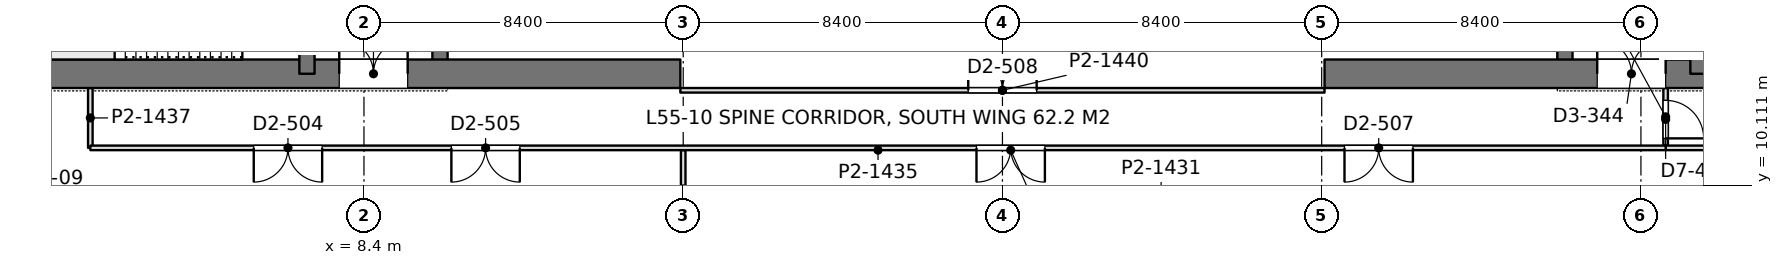
"""IFC4 building model, lengths in metres.
Left out: names, types, materials, properties, quantities, classifications, styles, units other than length and angle.
Written with IfcOpenShell. Run it as: python <this file> out.ifc"""

import sys

from ifc_helpers import new_model, si_unit, direction, frame, frame_2d, origin, place, context, subcontext, project, spatial, rectangle, extrude, element, fill, save


model = new_model("IFC4")
c1 = context("Model", 3, precision=1e-05, world=origin(), true_north=direction((0.0, 1.0)))
c2 = subcontext(c1, "Body", "Model", "MODEL_VIEW")
j1 = project(units=[si_unit("LENGTHUNIT", "METRE"), si_unit("PLANEANGLEUNIT", "RADIAN")], contexts=[c1])
p1 = place(None, origin())
s1 = spatial("IfcSite", under=j1, at=p1, CompositionType="ELEMENT")
p2 = place(p1, origin())
s2 = spatial("IfcBuilding", under=s1, at=p2, CompositionType="ELEMENT")
p3 = place(p2, frame((0.0, 0.0, 240.6)))
s3 = spatial("IfcBuildingStorey", under=s2, at=p3, CompositionType="ELEMENT", Elevation=240.6)
p4 = place(p3, frame((-1.125, 13.05, 0.0), z_axis=(0.0, 0.0, 1.0), x_axis=(1.0, 0.0, 0.0)))
e1 = element("IfcWall", 1, at=p4, inside=s3, PredefinedType="SHEAR", context=c2, shape_type="SweptSolid", body=[
    extrude(rectangle(XDim=17.85, YDim=0.75, at=frame_2d((8.925, 0.0))), origin(), (0.0, 0.0, 1.0), 4.2),
])
p5 = place(p4, frame((8.875, 0.0, 0.0)))
e2 = element("IfcOpeningElement", 2, at=p5, cuts=e1, PredefinedType="OPENING", context=c2, shape_type="SweptSolid", body=[
    extrude(rectangle(XDim=1.8, YDim=2.4, at=frame_2d((0.9, 1.2))), frame((0.0, 0.385, 0.0), z_axis=(0.0, -1.0, 0.0), x_axis=(1.0, 0.0, 0.0)), (0.0, 0.0, 1.0), 0.77),
])
p6 = place(p3, frame((6.9, 13.05, 0.0), z_axis=(0.0, 0.0, 1.0), x_axis=(0.0, 1.0, 0.0)))
e3 = element("IfcWall", 3, at=p6, inside=s3, PredefinedType="SHEAR", context=c2, shape_type="SweptSolid", body=[
    extrude(rectangle(XDim=24.3, YDim=0.4, at=frame_2d((12.15, 0.0))), origin(), (0.0, 0.0, 1.0), 4.2),
])
p7 = place(p6, frame((1.3, 0.0, 0.0)))
e4 = element("IfcOpeningElement", 4, at=p7, cuts=e3, PredefinedType="OPENING", context=c2, shape_type="SweptSolid", body=[
    extrude(rectangle(XDim=1.0, YDim=2.2, at=frame_2d((0.5, 1.1))), frame((0.0, 0.21, 0.0), z_axis=(0.0, -1.0, 0.0), x_axis=(1.0, 0.0, 0.0)), (0.0, 0.0, 1.0), 0.42),
])
p8 = place(p6, frame((22.0, 0.0, 0.0)))
e5 = element("IfcOpeningElement", 5, at=p8, cuts=e3, PredefinedType="OPENING", context=c2, shape_type="SweptSolid", body=[
    extrude(rectangle(XDim=1.0, YDim=2.2, at=frame_2d((0.5, 1.1))), frame((0.0, 0.21, 0.0), z_axis=(0.0, -1.0, 0.0), x_axis=(1.0, 0.0, 0.0)), (0.0, 0.0, 1.0), 0.42),
])
p9 = place(p6, frame((5.55, 0.0, 0.0)))
e6 = element("IfcOpeningElement", 6, at=p9, cuts=e3, PredefinedType="OPENING", context=c2, shape_type="SweptSolid", body=[
    extrude(rectangle(XDim=1.0, YDim=2.2, at=frame_2d((0.5, 1.1))), frame((0.0, 0.21, 0.0), z_axis=(0.0, -1.0, 0.0), x_axis=(1.0, 0.0, 0.0)), (0.0, 0.0, 1.0), 0.42),
])
p10 = place(p6, frame((9.55, 0.0, 0.0)))
e7 = element("IfcOpeningElement", 7, at=p10, cuts=e3, PredefinedType="OPENING", context=c2, shape_type="SweptSolid", body=[
    extrude(rectangle(XDim=1.0, YDim=2.2, at=frame_2d((0.5, 1.1))), frame((0.0, 0.21, 0.0), z_axis=(0.0, -1.0, 0.0), x_axis=(1.0, 0.0, 0.0)), (0.0, 0.0, 1.0), 0.42),
])
p11 = place(p6, frame((12.8, 0.0, 0.0)))
e8 = element("IfcOpeningElement", 8, at=p11, cuts=e3, PredefinedType="OPENING", context=c2, shape_type="SweptSolid", body=[
    extrude(rectangle(XDim=1.1, YDim=2.2, at=frame_2d((0.55, 1.1))), frame((0.0, 0.21, 0.0), z_axis=(0.0, -1.0, 0.0), x_axis=(1.0, 0.0, 0.0)), (0.0, 0.0, 1.0), 0.42),
])
p12 = place(p6, frame((15.538, 0.0, 0.0)))
e9 = element("IfcOpeningElement", 9, at=p12, cuts=e3, PredefinedType="OPENING", context=c2, shape_type="SweptSolid", body=[
    extrude(rectangle(XDim=1.1, YDim=2.2, at=frame_2d((0.55, 1.1))), frame((0.0, 0.21, 0.0), z_axis=(0.0, -1.0, 0.0), x_axis=(1.0, 0.0, 0.0)), (0.0, 0.0, 1.0), 0.42),
])
p13 = place(p6, frame((18.262, 0.0, 0.0)))
e10 = element("IfcOpeningElement", 10, at=p13, cuts=e3, PredefinedType="OPENING", context=c2, shape_type="SweptSolid", body=[
    extrude(rectangle(XDim=1.1, YDim=2.2, at=frame_2d((0.55, 1.1))), frame((0.0, 0.21, 0.0), z_axis=(0.0, -1.0, 0.0), x_axis=(1.0, 0.0, 0.0)), (0.0, 0.0, 1.0), 0.42),
])
p14 = place(p3, frame((10.4, 13.05, 0.0), z_axis=(0.0, 0.0, 1.0), x_axis=(0.0, 1.0, 0.0)))
e11 = element("IfcWall", 11, at=p14, inside=s3, PredefinedType="SHEAR", context=c2, shape_type="SweptSolid", body=[
    extrude(rectangle(XDim=24.3, YDim=0.4, at=frame_2d((12.15, 0.0))), origin(), (0.0, 0.0, 1.0), 4.2),
])
p15 = place(p14, frame((15.75, 0.0, 0.0)))
e12 = element("IfcOpeningElement", 12, at=p15, cuts=e11, PredefinedType="OPENING", context=c2, shape_type="SweptSolid", body=[
    extrude(rectangle(XDim=1.1, YDim=2.2, at=frame_2d((0.55, 1.1))), frame((0.0, 0.21, 0.0), z_axis=(0.0, -1.0, 0.0), x_axis=(1.0, 0.0, 0.0)), (0.0, 0.0, 1.0), 0.42),
])
p16 = place(p14, frame((18.6, 0.0, 0.0)))
e13 = element("IfcOpeningElement", 13, at=p16, cuts=e11, PredefinedType="OPENING", context=c2, shape_type="SweptSolid", body=[
    extrude(rectangle(XDim=1.1, YDim=2.2, at=frame_2d((0.55, 1.1))), frame((0.0, 0.21, 0.0), z_axis=(0.0, -1.0, 0.0), x_axis=(1.0, 0.0, 0.0)), (0.0, 0.0, 1.0), 0.42),
])
p17 = place(p14, frame((21.45, 0.0, 0.0)))
e14 = element("IfcOpeningElement", 14, at=p17, cuts=e11, PredefinedType="OPENING", context=c2, shape_type="SweptSolid", body=[
    extrude(rectangle(XDim=1.1, YDim=2.2, at=frame_2d((0.55, 1.1))), frame((0.0, 0.21, 0.0), z_axis=(0.0, -1.0, 0.0), x_axis=(1.0, 0.0, 0.0)), (0.0, 0.0, 1.0), 0.42),
])
p18 = place(p14, frame((8.65, 0.0, 0.0)))
e15 = element("IfcOpeningElement", 15, at=p18, cuts=e11, PredefinedType="OPENING", context=c2, shape_type="SweptSolid", body=[
    extrude(rectangle(XDim=1.8, YDim=2.4, at=frame_2d((0.9, 1.2))), frame((0.0, 0.21, 0.0), z_axis=(0.0, -1.0, 0.0), x_axis=(1.0, 0.0, 0.0)), (0.0, 0.0, 1.0), 0.42),
])
p19 = place(p3, frame((33.675, 13.05, 0.0), z_axis=(0.0, 0.0, 1.0), x_axis=(1.0, 0.0, 0.0)))
e16 = element("IfcWall", 16, at=p19, inside=s3, PredefinedType="SHEAR", context=c2, shape_type="SweptSolid", body=[
    extrude(rectangle(XDim=17.85, YDim=0.75, at=frame_2d((8.925, 0.0))), origin(), (0.0, 0.0, 1.0), 4.2),
])
p20 = place(p19, frame((7.175, 0.0, 0.0)))
e17 = element("IfcOpeningElement", 17, at=p20, cuts=e16, PredefinedType="OPENING", context=c2, shape_type="SweptSolid", body=[
    extrude(rectangle(XDim=1.8, YDim=2.4, at=frame_2d((0.9, 1.2))), frame((0.0, 0.385, 0.0), z_axis=(0.0, -1.0, 0.0), x_axis=(1.0, 0.0, 0.0)), (0.0, 0.0, 1.0), 0.77),
])
p21 = place(p3, frame((43.5, 13.05, 0.0), z_axis=(0.0, 0.0, 1.0), x_axis=(0.0, 1.0, 0.0)))
e18 = element("IfcWall", 18, at=p21, inside=s3, PredefinedType="SHEAR", context=c2, shape_type="SweptSolid", body=[
    extrude(rectangle(XDim=24.3, YDim=0.4, at=frame_2d((12.15, 0.0))), origin(), (0.0, 0.0, 1.0), 4.2),
])
p22 = place(p21, frame((1.3, 0.0, 0.0)))
e19 = element("IfcOpeningElement", 19, at=p22, cuts=e18, PredefinedType="OPENING", context=c2, shape_type="SweptSolid", body=[
    extrude(rectangle(XDim=1.0, YDim=2.2, at=frame_2d((0.5, 1.1))), frame((0.0, 0.21, 0.0), z_axis=(0.0, -1.0, 0.0), x_axis=(1.0, 0.0, 0.0)), (0.0, 0.0, 1.0), 0.42),
])
p23 = place(p21, frame((22.0, 0.0, 0.0)))
e20 = element("IfcOpeningElement", 20, at=p23, cuts=e18, PredefinedType="OPENING", context=c2, shape_type="SweptSolid", body=[
    extrude(rectangle(XDim=1.0, YDim=2.2, at=frame_2d((0.5, 1.1))), frame((0.0, 0.21, 0.0), z_axis=(0.0, -1.0, 0.0), x_axis=(1.0, 0.0, 0.0)), (0.0, 0.0, 1.0), 0.42),
])
p24 = place(p21, frame((5.55, 0.0, 0.0)))
e21 = element("IfcOpeningElement", 21, at=p24, cuts=e18, PredefinedType="OPENING", context=c2, shape_type="SweptSolid", body=[
    extrude(rectangle(XDim=1.0, YDim=2.2, at=frame_2d((0.5, 1.1))), frame((0.0, 0.21, 0.0), z_axis=(0.0, -1.0, 0.0), x_axis=(1.0, 0.0, 0.0)), (0.0, 0.0, 1.0), 0.42),
])
p25 = place(p21, frame((9.55, 0.0, 0.0)))
e22 = element("IfcOpeningElement", 22, at=p25, cuts=e18, PredefinedType="OPENING", context=c2, shape_type="SweptSolid", body=[
    extrude(rectangle(XDim=1.0, YDim=2.2, at=frame_2d((0.5, 1.1))), frame((0.0, 0.21, 0.0), z_axis=(0.0, -1.0, 0.0), x_axis=(1.0, 0.0, 0.0)), (0.0, 0.0, 1.0), 0.42),
])
p26 = place(p21, frame((12.8, 0.0, 0.0)))
e23 = element("IfcOpeningElement", 23, at=p26, cuts=e18, PredefinedType="OPENING", context=c2, shape_type="SweptSolid", body=[
    extrude(rectangle(XDim=1.1, YDim=2.2, at=frame_2d((0.55, 1.1))), frame((0.0, 0.21, 0.0), z_axis=(0.0, -1.0, 0.0), x_axis=(1.0, 0.0, 0.0)), (0.0, 0.0, 1.0), 0.42),
])
p27 = place(p21, frame((15.538, 0.0, 0.0)))
e24 = element("IfcOpeningElement", 24, at=p27, cuts=e18, PredefinedType="OPENING", context=c2, shape_type="SweptSolid", body=[
    extrude(rectangle(XDim=1.1, YDim=2.2, at=frame_2d((0.55, 1.1))), frame((0.0, 0.21, 0.0), z_axis=(0.0, -1.0, 0.0), x_axis=(1.0, 0.0, 0.0)), (0.0, 0.0, 1.0), 0.42),
])
p28 = place(p21, frame((18.262, 0.0, 0.0)))
e25 = element("IfcOpeningElement", 25, at=p28, cuts=e18, PredefinedType="OPENING", context=c2, shape_type="SweptSolid", body=[
    extrude(rectangle(XDim=1.1, YDim=2.2, at=frame_2d((0.55, 1.1))), frame((0.0, 0.21, 0.0), z_axis=(0.0, -1.0, 0.0), x_axis=(1.0, 0.0, 0.0)), (0.0, 0.0, 1.0), 0.42),
])
p29 = place(p3, frame((40.0, 13.05, 0.0), z_axis=(0.0, 0.0, 1.0), x_axis=(0.0, 1.0, 0.0)))
e26 = element("IfcWall", 26, at=p29, inside=s3, PredefinedType="SHEAR", context=c2, shape_type="SweptSolid", body=[
    extrude(rectangle(XDim=24.3, YDim=0.4, at=frame_2d((12.15, 0.0))), origin(), (0.0, 0.0, 1.0), 4.2),
])
p30 = place(p29, frame((15.75, 0.0, 0.0)))
e27 = element("IfcOpeningElement", 27, at=p30, cuts=e26, PredefinedType="OPENING", context=c2, shape_type="SweptSolid", body=[
    extrude(rectangle(XDim=1.1, YDim=2.2, at=frame_2d((0.55, 1.1))), frame((0.0, 0.21, 0.0), z_axis=(0.0, -1.0, 0.0), x_axis=(1.0, 0.0, 0.0)), (0.0, 0.0, 1.0), 0.42),
])
p31 = place(p29, frame((18.6, 0.0, 0.0)))
e28 = element("IfcOpeningElement", 28, at=p31, cuts=e26, PredefinedType="OPENING", context=c2, shape_type="SweptSolid", body=[
    extrude(rectangle(XDim=1.1, YDim=2.2, at=frame_2d((0.55, 1.1))), frame((0.0, 0.21, 0.0), z_axis=(0.0, -1.0, 0.0), x_axis=(1.0, 0.0, 0.0)), (0.0, 0.0, 1.0), 0.42),
])
p32 = place(p29, frame((21.45, 0.0, 0.0)))
e29 = element("IfcOpeningElement", 29, at=p32, cuts=e26, PredefinedType="OPENING", context=c2, shape_type="SweptSolid", body=[
    extrude(rectangle(XDim=1.1, YDim=2.2, at=frame_2d((0.55, 1.1))), frame((0.0, 0.21, 0.0), z_axis=(0.0, -1.0, 0.0), x_axis=(1.0, 0.0, 0.0)), (0.0, 0.0, 1.0), 0.42),
])
p33 = place(p29, frame((8.65, 0.0, 0.0)))
e30 = element("IfcOpeningElement", 30, at=p33, cuts=e26, PredefinedType="OPENING", context=c2, shape_type="SweptSolid", body=[
    extrude(rectangle(XDim=1.8, YDim=2.4, at=frame_2d((0.9, 1.2))), frame((0.0, 0.21, 0.0), z_axis=(0.0, -1.0, 0.0), x_axis=(1.0, 0.0, 0.0)), (0.0, 0.0, 1.0), 0.42),
])
p34 = place(p3, frame((16.8, 8.999, 0.0), z_axis=(0.0, 0.0, 1.0), x_axis=(0.0, 1.0, 0.0)))
e31 = element("IfcWall", 31, at=p34, inside=s3, PredefinedType="PARTITIONING", context=c2, shape_type="SweptSolid", body=[
    extrude(rectangle(XDim=2.043, YDim=0.12, at=frame_2d((1.021, 0.0))), origin(), (0.0, 0.0, 1.0), 3.543),
])
p35 = place(p3, frame((1.2, 11.1, 0.0), z_axis=(0.0, 0.0, 1.0), x_axis=(1.0, 0.0, 0.0)))
e32 = element("IfcWall", 32, at=p35, inside=s3, PredefinedType="PARTITIONING", context=c2, shape_type="SweptSolid", body=[
    extrude(rectangle(XDim=41.452, YDim=0.12, at=frame_2d((20.726, 0.0))), origin(), (0.0, 0.0, 1.0), 3.3),
])
p36 = place(p35, frame((4.3, 0.0, 0.0)))
e33 = element("IfcOpeningElement", 33, at=p36, cuts=e32, PredefinedType="OPENING", context=c2, shape_type="SweptSolid", body=[
    extrude(rectangle(XDim=1.8, YDim=2.2, at=frame_2d((0.9, 1.1))), frame((0.0, 0.07, 0.0), z_axis=(0.0, -1.0, 0.0), x_axis=(1.0, 0.0, 0.0)), (0.0, 0.0, 1.0), 0.14),
])
p37 = place(p35, frame((9.5, 0.0, 0.0)))
e34 = element("IfcOpeningElement", 34, at=p37, cuts=e32, PredefinedType="OPENING", context=c2, shape_type="SweptSolid", body=[
    extrude(rectangle(XDim=1.8, YDim=2.2, at=frame_2d((0.9, 1.1))), frame((0.0, 0.07, 0.0), z_axis=(0.0, -1.0, 0.0), x_axis=(1.0, 0.0, 0.0)), (0.0, 0.0, 1.0), 0.14),
])
p38 = place(p35, frame((23.317, 0.0, 0.0)))
e35 = element("IfcOpeningElement", 35, at=p38, cuts=e32, PredefinedType="OPENING", context=c2, shape_type="SweptSolid", body=[
    extrude(rectangle(XDim=1.8, YDim=2.2, at=frame_2d((0.9, 1.1))), frame((0.0, 0.07, 0.0), z_axis=(0.0, -1.0, 0.0), x_axis=(1.0, 0.0, 0.0)), (0.0, 0.0, 1.0), 0.14),
])
p39 = place(p35, frame((33.0, 0.0, 0.0)))
e36 = element("IfcOpeningElement", 36, at=p39, cuts=e32, PredefinedType="OPENING", context=c2, shape_type="SweptSolid", body=[
    extrude(rectangle(XDim=1.8, YDim=2.2, at=frame_2d((0.9, 1.1))), frame((0.0, 0.07, 0.0), z_axis=(0.0, -1.0, 0.0), x_axis=(1.0, 0.0, 0.0)), (0.0, 0.0, 1.0), 0.14),
])
p40 = place(p3, frame((1.2, 11.1, 0.0), z_axis=(0.0, 0.0, 1.0), x_axis=(0.0, 1.0, 0.0)))
e37 = element("IfcWall", 37, at=p40, inside=s3, PredefinedType="PARTITIONING", context=c2, shape_type="SweptSolid", body=[
    extrude(rectangle(XDim=1.576, YDim=0.12, at=frame_2d((0.788, 0.0))), origin(), (0.0, 0.0, 1.0), 4.0),
])
p41 = place(p3, frame((42.65, 11.158, 0.0), z_axis=(0.0, 0.0, 1.0), x_axis=(0.0, 1.0, 0.0)))
e38 = element("IfcWall", 38, at=p41, inside=s3, PredefinedType="PARTITIONING", context=c2, shape_type="SweptSolid", body=[
    extrude(rectangle(XDim=1.518, YDim=0.12, at=frame_2d((0.759, 0.0))), origin(), (0.0, 0.0, 1.0), 4.0),
])
p42 = place(p41, frame((0.192, 0.0, 0.0)))
e39 = element("IfcOpeningElement", 39, at=p42, cuts=e38, PredefinedType="OPENING", context=c2, shape_type="SweptSolid", body=[
    extrude(rectangle(XDim=1.0, YDim=2.4, at=frame_2d((0.5, 1.2))), frame((0.0, 0.07, 0.0), z_axis=(0.0, -1.0, 0.0), x_axis=(1.0, 0.0, 0.0)), (0.0, 0.0, 1.0), 0.14),
])
p43 = place(p3, frame((42.648, 11.1, 0.0), z_axis=(0.0, 0.0, 1.0), x_axis=(1.0, 0.0, 0.0)))
e40 = element("IfcWall", 40, at=p43, inside=s3, PredefinedType="PARTITIONING", context=c2, shape_type="SweptSolid", body=[
    extrude(rectangle(XDim=6.552, YDim=0.12, at=frame_2d((3.276, 0.0))), origin(), (0.0, 0.0, 1.0), 4.0),
])
p44 = place(p3, frame((16.725, 12.615, 0.0), z_axis=(0.0, 0.0, 1.0), x_axis=(1.0, 0.0, 0.0)))
e41 = element("IfcWall", 41, at=p44, inside=s3, PredefinedType="PARTITIONING", context=c2, shape_type="SweptSolid", body=[
    extrude(rectangle(XDim=16.95, YDim=0.12, at=frame_2d((8.475, 0.0))), origin(), (0.0, 0.0, 1.0), 3.3),
])
p45 = place(p44, frame((7.575, 0.0, 0.0)))
e42 = element("IfcOpeningElement", 42, at=p45, cuts=e41, PredefinedType="OPENING", context=c2, shape_type="SweptSolid", body=[
    extrude(rectangle(XDim=1.8, YDim=2.2, at=frame_2d((0.9, 1.1))), frame((0.0, 0.07, 0.0), z_axis=(0.0, -1.0, 0.0), x_axis=(1.0, 0.0, 0.0)), (0.0, 0.0, 1.0), 0.14),
])
p46 = place(p5, origin())
e43 = element("IfcDoor", 43, at=p46, inside=s3, OperationType="DOUBLE_DOOR_SINGLE_SWING", PredefinedType="DOOR", context=c2, shape_type="SweptSolid", body=[
    extrude(rectangle(XDim=1.8, YDim=2.4, at=frame_2d((0.9, 1.2))), frame((0.0, 0.025, 0.0), z_axis=(0.0, -1.0, 0.0), x_axis=(1.0, 0.0, 0.0)), (0.0, 0.0, 1.0), 0.05),
])
fill(e2, e43)
p47 = place(p20, origin())
e44 = element("IfcDoor", 44, at=p47, inside=s3, OperationType="DOUBLE_DOOR_SINGLE_SWING", PredefinedType="DOOR", context=c2, shape_type="SweptSolid", body=[
    extrude(rectangle(XDim=1.8, YDim=2.4, at=frame_2d((0.9, 1.2))), frame((0.0, 0.025, 0.0), z_axis=(0.0, -1.0, 0.0), x_axis=(1.0, 0.0, 0.0)), (0.0, 0.0, 1.0), 0.05),
])
fill(e17, e44)
p48 = place(p36, frame((1.8, 0.0, 0.0), z_axis=(0.0, 0.0, 1.0), x_axis=(-1.0, 0.0, 0.0)))
e45 = element("IfcDoor", 45, at=p48, inside=s3, OperationType="DOUBLE_DOOR_SINGLE_SWING", PredefinedType="DOOR", context=c2, shape_type="SweptSolid", body=[
    extrude(rectangle(XDim=1.8, YDim=2.2, at=frame_2d((0.9, 1.1))), frame((0.0, 0.025, 0.0), z_axis=(0.0, -1.0, 0.0), x_axis=(1.0, 0.0, 0.0)), (0.0, 0.0, 1.0), 0.05),
])
fill(e33, e45)
p49 = place(p37, frame((1.8, 0.0, 0.0), z_axis=(0.0, 0.0, 1.0), x_axis=(-1.0, 0.0, 0.0)))
e46 = element("IfcDoor", 46, at=p49, inside=s3, OperationType="DOUBLE_DOOR_SINGLE_SWING", PredefinedType="DOOR", context=c2, shape_type="SweptSolid", body=[
    extrude(rectangle(XDim=1.8, YDim=2.2, at=frame_2d((0.9, 1.1))), frame((0.0, 0.025, 0.0), z_axis=(0.0, -1.0, 0.0), x_axis=(1.0, 0.0, 0.0)), (0.0, 0.0, 1.0), 0.05),
])
fill(e34, e46)
p50 = place(p38, frame((1.8, 0.0, 0.0), z_axis=(0.0, 0.0, 1.0), x_axis=(-1.0, 0.0, 0.0)))
e47 = element("IfcDoor", 47, at=p50, inside=s3, OperationType="DOUBLE_DOOR_SINGLE_SWING", PredefinedType="DOOR", context=c2, shape_type="SweptSolid", body=[
    extrude(rectangle(XDim=1.8, YDim=2.2, at=frame_2d((0.9, 1.1))), frame((0.0, 0.025, 0.0), z_axis=(0.0, -1.0, 0.0), x_axis=(1.0, 0.0, 0.0)), (0.0, 0.0, 1.0), 0.05),
])
fill(e35, e47)
p51 = place(p39, frame((1.8, 0.0, 0.0), z_axis=(0.0, 0.0, 1.0), x_axis=(-1.0, 0.0, 0.0)))
e48 = element("IfcDoor", 48, at=p51, inside=s3, OperationType="DOUBLE_DOOR_SINGLE_SWING", PredefinedType="DOOR", context=c2, shape_type="SweptSolid", body=[
    extrude(rectangle(XDim=1.8, YDim=2.2, at=frame_2d((0.9, 1.1))), frame((0.0, 0.025, 0.0), z_axis=(0.0, -1.0, 0.0), x_axis=(1.0, 0.0, 0.0)), (0.0, 0.0, 1.0), 0.05),
])
fill(e36, e48)
p52 = place(p42, frame((1.0, 0.0, 0.0), z_axis=(0.0, 0.0, 1.0), x_axis=(-1.0, 0.0, 0.0)))
e49 = element("IfcDoor", 49, at=p52, inside=s3, OperationType="SINGLE_SWING_RIGHT", PredefinedType="DOOR", context=c2, shape_type="SweptSolid", body=[
    extrude(rectangle(XDim=1.0, YDim=2.4, at=frame_2d((0.5, 1.2))), frame((0.0, 0.025, 0.0), z_axis=(0.0, -1.0, 0.0), x_axis=(1.0, 0.0, 0.0)), (0.0, 0.0, 1.0), 0.05),
])
fill(e39, e49)
p53 = place(p45, origin())
e50 = element("IfcDoor", 50, at=p53, inside=s3, OperationType="DOUBLE_DOOR_SINGLE_SWING", PredefinedType="DOOR", context=c2, shape_type="SweptSolid", body=[
    extrude(rectangle(XDim=1.8, YDim=2.2, at=frame_2d((0.9, 1.1))), frame((0.0, 0.025, 0.0), z_axis=(0.0, -1.0, 0.0), x_axis=(1.0, 0.0, 0.0)), (0.0, 0.0, 1.0), 0.05),
])
fill(e42, e50)
save(model, sys.argv[1])
